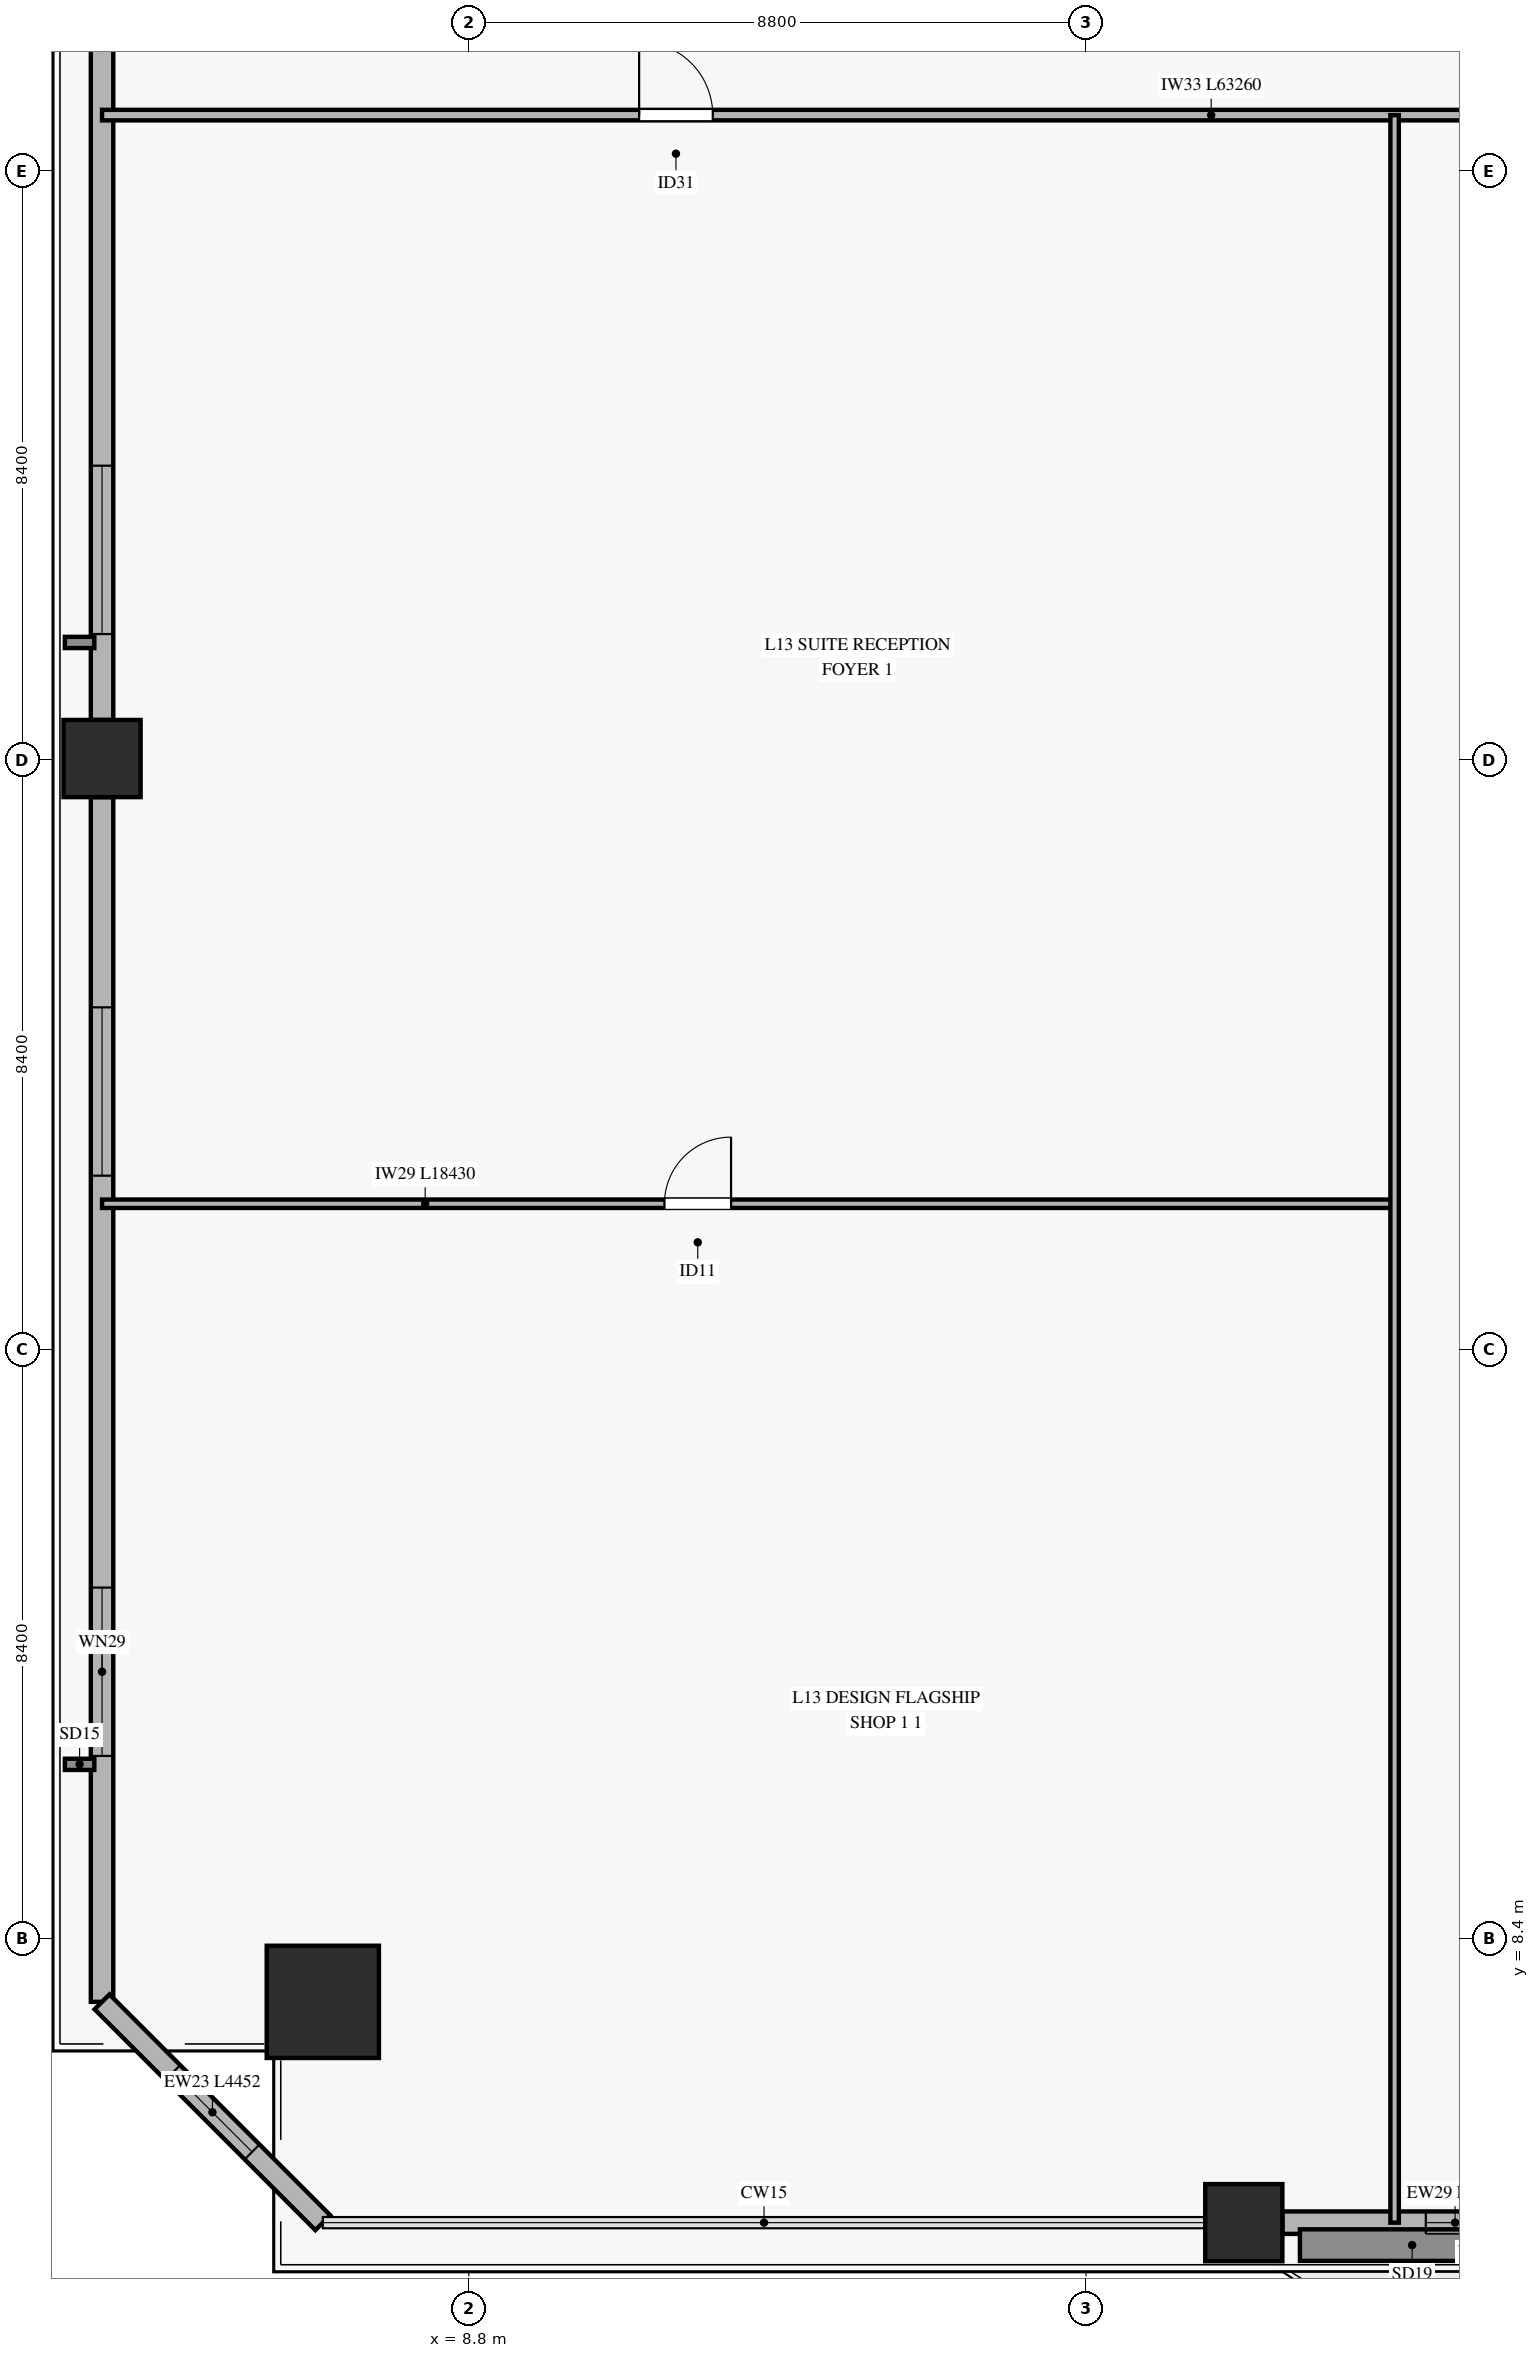
"""IFC4 building model, lengths in metres.
Left out: names, types, materials, properties, quantities, classifications, styles, units other than length and angle.
Written with IfcOpenShell. Run it as: python <this file> out.ifc"""

import sys

from ifc_helpers import new_model, si_unit, direction, frame, frame_2d, origin, origin_2d, place, context, subcontext, project, spatial, rectangle, hollow_rectangle, extrude, source, transform, mapped, element, fill, save


model = new_model("IFC4")
c1 = context("Model", 3, precision=1e-05, world=origin(), true_north=direction((0.0, 1.0)))
c2 = subcontext(c1, "Body", "Model", "MODEL_VIEW")
j1 = project(units=[si_unit("LENGTHUNIT", "METRE"), si_unit("PLANEANGLEUNIT", "RADIAN")], contexts=[c1])
p1 = place(None, origin())
s1 = spatial("IfcSite", under=j1, at=p1, CompositionType="ELEMENT")
p2 = place(p1, origin())
s2 = spatial("IfcBuilding", under=s1, at=p2, CompositionType="ELEMENT")
p3 = place(p2, frame((0.0, 0.0, 53.3)))
s3 = spatial("IfcBuildingStorey", under=s2, at=p3, CompositionType="ELEMENT", Elevation=53.3)
m1 = source(origin(), c2, "Body", "SweptSolid", [
    extrude(hollow_rectangle(XDim=1.6, YDim=1.6, WallThickness=0.075, at=origin_2d()), origin(), (0.0, 0.0, 1.0), 3.68),
])
p4 = place(p3, frame((6.718, 7.502, 0.0), z_axis=(0.0, 0.0, 1.0), x_axis=(1.0, 0.0, 0.0)))
e1 = element("IfcColumn", 1, at=p4, inside=s3, PredefinedType="COLUMN", context=c2, shape_type="MappedRepresentation", body=[
    mapped(m1, transform((0.0, 0.0, 0.0), x_axis=(1.0, 0.0, 0.0), y_axis=(0.0, 1.0, 0.0), z_axis=(0.0, 0.0, 1.0), scale=1.0)),
])
m2 = source(origin(), c2, "Body", "SweptSolid", [
    extrude(hollow_rectangle(XDim=1.1, YDim=1.1, WallThickness=0.05, at=origin_2d()), origin(), (0.0, 0.0, 1.0), 3.68),
])
for number, where, z_axis, x_axis in (
    (2, (19.85, 4.354, 0.0), (0.0, 0.0, 1.0), (1.0, 0.0, 0.0)),
    (3, (3.57, 25.227, 0.0), (0.0, 0.0, 1.0), (1.0, 0.0, 0.0)),
):
    element("IfcColumn", number, at=place(p3, frame(where, z_axis=z_axis, x_axis=x_axis)), inside=s3, PredefinedType="COLUMN", context=c2, shape_type="MappedRepresentation", body=[
        mapped(m2, transform((0.0, 0.0, 0.0), x_axis=(1.0, 0.0, 0.0), y_axis=(0.0, 1.0, 0.0), z_axis=(0.0, 0.0, 1.0), scale=1.0)),
    ])
p5 = place(p3, frame((20.4, 4.354, 0.0), z_axis=(0.0, 0.0, 1.0), x_axis=(1.0, 0.0, 0.0)))
e4 = element("IfcWall", 4, at=p5, inside=s3, PredefinedType="SOLIDWALL", context=c2, shape_type="SweptSolid", body=[
    extrude(rectangle(XDim=9.85, YDim=0.32, at=frame_2d((4.925, 0.0))), origin(), (0.0, 0.0, 1.0), 3.16),
])
p6 = place(p5, frame((4.0, 0.0, 0.0)))
e5 = element("IfcOpeningElement", 5, at=p6, cuts=e4, PredefinedType="OPENING", context=c2, shape_type="SweptSolid", body=[
    extrude(rectangle(XDim=1.8, YDim=2.25, at=frame_2d((0.9, 1.125))), frame((0.0, 0.17, 0.0), z_axis=(0.0, -1.0, 0.0), x_axis=(1.0, 0.0, 0.0)), (0.0, 0.0, 1.0), 0.34),
])
p7 = place(p5, frame((2.045, 0.0, 0.45)))
e6 = element("IfcOpeningElement", 6, at=p7, cuts=e4, PredefinedType="OPENING", context=c2, shape_type="SweptSolid", body=[
    extrude(rectangle(XDim=1.6, YDim=2.0, at=frame_2d((0.8, 1.0))), frame((0.0, 0.17, 0.0), z_axis=(0.0, -1.0, 0.0), x_axis=(1.0, 0.0, 0.0)), (0.0, 0.0, 1.0), 0.34),
])
p8 = place(p5, frame((7.35, 0.0, 0.45)))
e7 = element("IfcOpeningElement", 7, at=p8, cuts=e4, PredefinedType="OPENING", context=c2, shape_type="SweptSolid", body=[
    extrude(rectangle(XDim=1.6, YDim=2.0, at=frame_2d((0.8, 1.0))), frame((0.0, 0.17, 0.0), z_axis=(0.0, -1.0, 0.0), x_axis=(1.0, 0.0, 0.0)), (0.0, 0.0, 1.0), 0.34),
])
p9 = place(p3, frame((3.57, 7.502, 0.0), z_axis=(0.0, 0.0, 1.0), x_axis=(0.0, 1.0, 0.0)))
e8 = element("IfcWall", 8, at=p9, inside=s3, PredefinedType="SOLIDWALL", context=c2, shape_type="SweptSolid", body=[
    extrude(rectangle(XDim=17.175, YDim=0.32, at=frame_2d((8.587, 0.0))), origin(), (0.0, 0.0, 1.0), 3.16),
])
p10 = place(p9, frame((3.506, 0.0, 0.45)))
e9 = element("IfcOpeningElement", 9, at=p10, cuts=e8, PredefinedType="OPENING", context=c2, shape_type="SweptSolid", body=[
    extrude(rectangle(XDim=2.4, YDim=2.1, at=frame_2d((1.2, 1.05))), frame((0.0, 0.17, 0.0), z_axis=(0.0, -1.0, 0.0), x_axis=(1.0, 0.0, 0.0)), (0.0, 0.0, 1.0), 0.34),
])
p11 = place(p9, frame((11.778, 0.0, 0.45)))
e10 = element("IfcOpeningElement", 10, at=p11, cuts=e8, PredefinedType="OPENING", context=c2, shape_type="SweptSolid", body=[
    extrude(rectangle(XDim=2.4, YDim=2.1, at=frame_2d((1.2, 1.05))), frame((0.0, 0.17, 0.0), z_axis=(0.0, -1.0, 0.0), x_axis=(1.0, 0.0, 0.0)), (0.0, 0.0, 1.0), 0.34),
])
p12 = place(p3, frame((3.57, 25.777, 0.0), z_axis=(0.0, 0.0, 1.0), x_axis=(0.0, 1.0, 0.0)))
e11 = element("IfcWall", 11, at=p12, inside=s3, PredefinedType="SOLIDWALL", context=c2, shape_type="SweptSolid", body=[
    extrude(rectangle(XDim=17.175, YDim=0.32, at=frame_2d((8.587, 0.0))), origin(), (0.0, 0.0, 1.0), 3.16),
])
p13 = place(p12, frame((1.225, 0.0, 0.45)))
e12 = element("IfcOpeningElement", 12, at=p13, cuts=e11, PredefinedType="OPENING", context=c2, shape_type="SweptSolid", body=[
    extrude(rectangle(XDim=2.4, YDim=2.1, at=frame_2d((1.2, 1.05))), frame((0.0, 0.17, 0.0), z_axis=(0.0, -1.0, 0.0), x_axis=(1.0, 0.0, 0.0)), (0.0, 0.0, 1.0), 0.34),
])
p14 = place(p12, frame((12.981, 0.0, 0.45)))
e13 = element("IfcOpeningElement", 13, at=p14, cuts=e11, PredefinedType="OPENING", context=c2, shape_type="SweptSolid", body=[
    extrude(rectangle(XDim=2.4, YDim=2.1, at=frame_2d((1.2, 1.05))), frame((0.0, 0.17, 0.0), z_axis=(0.0, -1.0, 0.0), x_axis=(1.0, 0.0, 0.0)), (0.0, 0.0, 1.0), 0.34),
])
p15 = place(p3, frame((3.57, 7.502, 0.0), z_axis=(0.0, 0.0, 1.0), x_axis=(0.707106781187, -0.707106781187, 0.0)))
e14 = element("IfcWall", 14, at=p15, inside=s3, PredefinedType="SOLIDWALL", context=c2, shape_type="SweptSolid", body=[
    extrude(rectangle(XDim=4.452, YDim=0.3, at=frame_2d((2.226, 0.0))), origin(), (0.0, 0.0, 1.0), 3.16),
])
p16 = place(p15, frame((1.426, 0.0, 0.45)))
e15 = element("IfcOpeningElement", 15, at=p16, cuts=e14, PredefinedType="OPENING", context=c2, shape_type="SweptSolid", body=[
    extrude(rectangle(XDim=1.6, YDim=2.0, at=frame_2d((0.8, 1.0))), frame((0.0, 0.16, 0.0), z_axis=(0.0, -1.0, 0.0), x_axis=(1.0, 0.0, 0.0)), (0.0, 0.0, 1.0), 0.32),
])
p17 = place(p3, frame((3.57, 34.4, 0.0), z_axis=(0.0, 0.0, 1.0), x_axis=(1.0, 0.0, 0.0)))
e16 = element("IfcWall", 16, at=p17, inside=s3, PredefinedType="PARTITIONING", context=c2, shape_type="SweptSolid", body=[
    extrude(rectangle(XDim=63.26, YDim=0.15, at=frame_2d((31.63, 0.0))), origin(), (0.0, 0.0, 1.0), 2.765),
])
p18 = place(p17, frame((7.658, 0.0, 0.0)))
e17 = element("IfcOpeningElement", 17, at=p18, cuts=e16, PredefinedType="OPENING", context=c2, shape_type="SweptSolid", body=[
    extrude(rectangle(XDim=1.05, YDim=2.15, at=frame_2d((0.525, 1.075))), frame((0.0, 0.085, 0.0), z_axis=(0.0, -1.0, 0.0), x_axis=(1.0, 0.0, 0.0)), (0.0, 0.0, 1.0), 0.17),
])
p19 = place(p17, frame((22.121, 0.0, 0.0)))
e18 = element("IfcOpeningElement", 18, at=p19, cuts=e16, PredefinedType="OPENING", context=c2, shape_type="SweptSolid", body=[
    extrude(rectangle(XDim=1.05, YDim=2.15, at=frame_2d((0.525, 1.075))), frame((0.0, 0.085, 0.0), z_axis=(0.0, -1.0, 0.0), x_axis=(1.0, 0.0, 0.0)), (0.0, 0.0, 1.0), 0.17),
])
p20 = place(p17, frame((30.437, 0.0, 0.0)))
e19 = element("IfcOpeningElement", 19, at=p20, cuts=e16, PredefinedType="OPENING", context=c2, shape_type="SweptSolid", body=[
    extrude(rectangle(XDim=1.05, YDim=2.15, at=frame_2d((0.525, 1.075))), frame((0.0, 0.085, 0.0), z_axis=(0.0, -1.0, 0.0), x_axis=(1.0, 0.0, 0.0)), (0.0, 0.0, 1.0), 0.17),
])
p21 = place(p17, frame((37.965, 0.0, 0.0)))
e20 = element("IfcOpeningElement", 20, at=p21, cuts=e16, PredefinedType="OPENING", context=c2, shape_type="SweptSolid", body=[
    extrude(rectangle(XDim=1.05, YDim=2.15, at=frame_2d((0.525, 1.075))), frame((0.0, 0.085, 0.0), z_axis=(0.0, -1.0, 0.0), x_axis=(1.0, 0.0, 0.0)), (0.0, 0.0, 1.0), 0.17),
])
p22 = place(p17, frame((50.368, 0.0, 0.0)))
e21 = element("IfcOpeningElement", 21, at=p22, cuts=e16, PredefinedType="OPENING", context=c2, shape_type="SweptSolid", body=[
    extrude(rectangle(XDim=1.05, YDim=2.15, at=frame_2d((0.525, 1.075))), frame((0.0, 0.085, 0.0), z_axis=(0.0, -1.0, 0.0), x_axis=(1.0, 0.0, 0.0)), (0.0, 0.0, 1.0), 0.17),
])
p23 = place(p3, frame((3.57, 18.88, 0.0), z_axis=(0.0, 0.0, 1.0), x_axis=(1.0, 0.0, 0.0)))
e22 = element("IfcWall", 22, at=p23, inside=s3, PredefinedType="PARTITIONING", context=c2, shape_type="SweptSolid", body=[
    extrude(rectangle(XDim=18.43, YDim=0.12, at=frame_2d((9.215, 0.0))), origin(), (0.0, 0.0, 1.0), 2.765),
])
p24 = place(p23, frame((8.019, 0.0, 0.0)))
e23 = element("IfcOpeningElement", 23, at=p24, cuts=e22, PredefinedType="OPENING", context=c2, shape_type="SweptSolid", body=[
    extrude(rectangle(XDim=0.95, YDim=2.1, at=frame_2d((0.475, 1.05))), frame((0.0, 0.07, 0.0), z_axis=(0.0, -1.0, 0.0), x_axis=(1.0, 0.0, 0.0)), (0.0, 0.0, 1.0), 0.14),
])
p25 = place(p3, frame((22.0, 4.354, 0.0), z_axis=(0.0, 0.0, 1.0), x_axis=(0.0, 1.0, 0.0)))
e24 = element("IfcWall", 24, at=p25, inside=s3, PredefinedType="PARTITIONING", context=c2, shape_type="SweptSolid", body=[
    extrude(rectangle(XDim=30.046, YDim=0.12, at=frame_2d((15.023, 0.0))), origin(), (0.0, 0.0, 1.0), 3.165),
])
m3 = source(origin(), c2, "Body", "SweptSolid", [
    extrude(rectangle(XDim=1.6, YDim=2.0, at=frame_2d((0.8, 1.0))), frame((0.0, 0.03, 0.0), z_axis=(0.0, -1.0, 0.0), x_axis=(1.0, 0.0, 0.0)), (0.0, 0.0, 1.0), 0.06),
])
p26 = place(p7, origin())
e25 = element("IfcWindow", 25, at=p26, inside=s3, PartitioningType="SINGLE_PANEL", PredefinedType="WINDOW", context=c2, shape_type="MappedRepresentation", body=[
    mapped(m3, transform((0.0, 0.0, 0.0), x_axis=(1.0, 0.0, 0.0), y_axis=(0.0, 1.0, 0.0), z_axis=(0.0, 0.0, 1.0), scale=1.0)),
])
fill(e6, e25)
m4 = source(origin(), c2, "Body", "SweptSolid", [
    extrude(rectangle(XDim=2.4, YDim=2.1, at=frame_2d((1.2, 1.05))), frame((0.0, 0.03, 0.0), z_axis=(0.0, -1.0, 0.0), x_axis=(1.0, 0.0, 0.0)), (0.0, 0.0, 1.0), 0.06),
])
p27 = place(p10, origin())
e26 = element("IfcWindow", 26, at=p27, inside=s3, PartitioningType="SINGLE_PANEL", PredefinedType="WINDOW", context=c2, shape_type="MappedRepresentation", body=[
    mapped(m4, transform((0.0, 0.0, 0.0), x_axis=(1.0, 0.0, 0.0), y_axis=(0.0, 1.0, 0.0), z_axis=(0.0, 0.0, 1.0), scale=1.0)),
])
fill(e9, e26)
p28 = place(p11, origin())
e27 = element("IfcWindow", 27, at=p28, inside=s3, PartitioningType="SINGLE_PANEL", PredefinedType="WINDOW", context=c2, shape_type="MappedRepresentation", body=[
    mapped(m4, transform((0.0, 0.0, 0.0), x_axis=(1.0, 0.0, 0.0), y_axis=(0.0, 1.0, 0.0), z_axis=(0.0, 0.0, 1.0), scale=1.0)),
])
fill(e10, e27)
p29 = place(p13, origin())
e28 = element("IfcWindow", 28, at=p29, inside=s3, PartitioningType="SINGLE_PANEL", PredefinedType="WINDOW", context=c2, shape_type="MappedRepresentation", body=[
    mapped(m4, transform((0.0, 0.0, 0.0), x_axis=(1.0, 0.0, 0.0), y_axis=(0.0, 1.0, 0.0), z_axis=(0.0, 0.0, 1.0), scale=1.0)),
])
fill(e12, e28)
p30 = place(p16, origin())
e29 = element("IfcWindow", 29, at=p30, inside=s3, PartitioningType="SINGLE_PANEL", PredefinedType="WINDOW", context=c2, shape_type="MappedRepresentation", body=[
    mapped(m3, transform((0.0, 0.0, 0.0), x_axis=(1.0, 0.0, 0.0), y_axis=(0.0, 1.0, 0.0), z_axis=(0.0, 0.0, 1.0), scale=1.0)),
])
fill(e15, e29)
m5 = source(origin(), c2, "Body", "SweptSolid", [
    extrude(rectangle(XDim=1.05, YDim=2.15, at=frame_2d((0.525, 1.075))), frame((0.0, 0.025, 0.0), z_axis=(0.0, -1.0, 0.0), x_axis=(1.0, 0.0, 0.0)), (0.0, 0.0, 1.0), 0.05),
])
p31 = place(p18, origin())
e30 = element("IfcDoor", 30, at=p31, inside=s3, OperationType="SINGLE_SWING_LEFT", PredefinedType="DOOR", context=c2, shape_type="MappedRepresentation", body=[
    mapped(m5, transform((0.0, 0.0, 0.0), x_axis=(1.0, 0.0, 0.0), y_axis=(0.0, 1.0, 0.0), z_axis=(0.0, 0.0, 1.0), scale=1.0)),
])
fill(e17, e30)
m6 = source(origin(), c2, "Body", "SweptSolid", [
    extrude(rectangle(XDim=0.95, YDim=2.1, at=frame_2d((0.475, 1.05))), frame((0.0, 0.025, 0.0), z_axis=(0.0, -1.0, 0.0), x_axis=(1.0, 0.0, 0.0)), (0.0, 0.0, 1.0), 0.05),
])
p32 = place(p24, origin())
e31 = element("IfcDoor", 31, at=p32, inside=s3, OperationType="SINGLE_SWING_RIGHT", PredefinedType="DOOR", context=c2, shape_type="MappedRepresentation", body=[
    mapped(m6, transform((0.0, 0.0, 0.0), x_axis=(1.0, 0.0, 0.0), y_axis=(0.0, 1.0, 0.0), z_axis=(0.0, 0.0, 1.0), scale=1.0)),
])
fill(e23, e31)
save(model, sys.argv[1])
